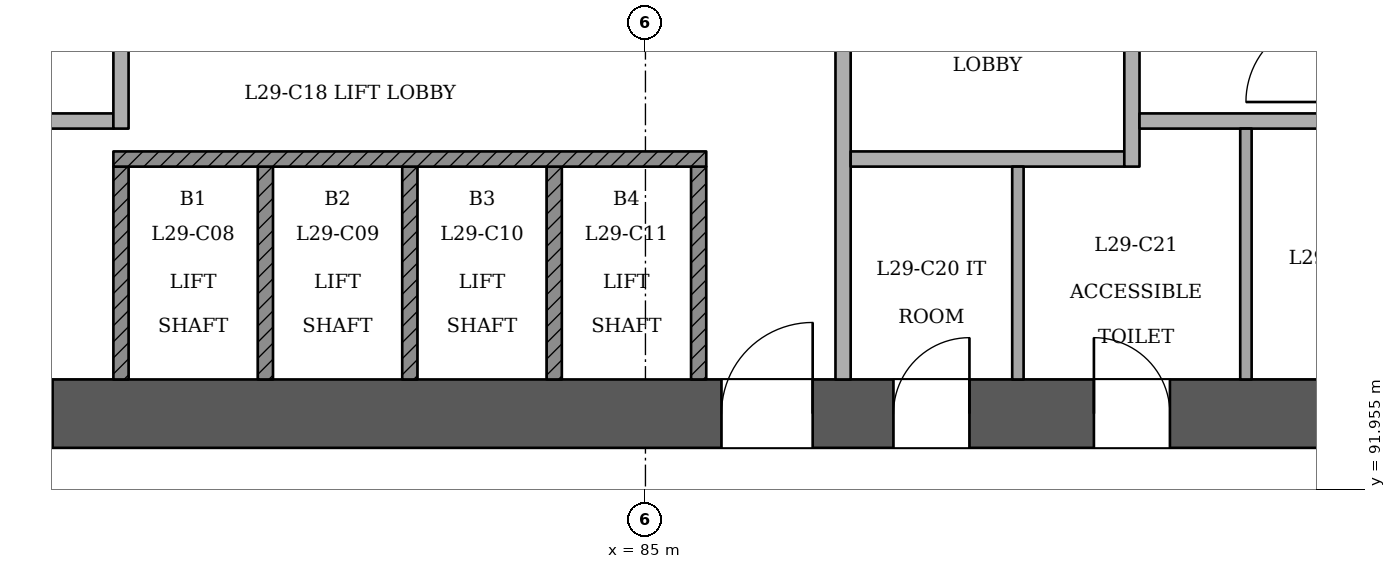
"""IFC4 building model, lengths in metres.
Left out: names, types, materials, properties, quantities, classifications, styles, units other than length and angle.
Written with IfcOpenShell. Run it as: python <this file> out.ifc"""

import sys

from ifc_helpers import new_model, si_unit, direction, frame, frame_2d, origin, place, context, subcontext, project, spatial, rectangle, extrude, element, fill, save


model = new_model("IFC4")
c1 = context("Model", 3, precision=1e-05, world=origin(), true_north=direction((0.0, 1.0)))
c2 = subcontext(c1, "Body", "Model", "MODEL_VIEW")
j1 = project(units=[si_unit("LENGTHUNIT", "METRE"), si_unit("PLANEANGLEUNIT", "RADIAN")], contexts=[c1])
p1 = place(None, origin())
s1 = spatial("IfcSite", under=j1, at=p1, CompositionType="ELEMENT")
p2 = place(p1, origin())
s2 = spatial("IfcBuilding", under=s1, at=p2, CompositionType="ELEMENT")
p3 = place(p2, frame((0.0, 0.0, 115.2)))
s3 = spatial("IfcBuildingStorey", under=s2, at=p3, CompositionType="ELEMENT", Elevation=115.2)
p4 = place(p3, frame((72.55, 92.95, 0.0), z_axis=(0.0, 0.0, 1.0), x_axis=(1.0, 0.0, 0.0)))
e1 = element("IfcWall", 1, at=p4, inside=s3, PredefinedType="SHEAR", context=c2, shape_type="SweptSolid", body=[
    extrude(rectangle(XDim=25.35, YDim=0.9, at=frame_2d((12.675, 0.0))), origin(), (0.0, 0.0, 1.0), 3.6),
])
p5 = place(p4, frame((1.25, 0.0, 0.0)))
e2 = element("IfcOpeningElement", 2, at=p5, cuts=e1, PredefinedType="OPENING", context=c2, shape_type="SweptSolid", body=[
    extrude(rectangle(XDim=1.2, YDim=2.1, at=frame_2d((0.6, 1.05))), frame((0.0, 0.46, 0.0), z_axis=(0.0, -1.0, 0.0), x_axis=(1.0, 0.0, 0.0)), (0.0, 0.0, 1.0), 0.921),
])
p6 = place(p4, frame((3.45, 0.0, 0.0)))
e3 = element("IfcOpeningElement", 3, at=p6, cuts=e1, PredefinedType="OPENING", context=c2, shape_type="SweptSolid", body=[
    extrude(rectangle(XDim=1.2, YDim=2.1, at=frame_2d((0.6, 1.05))), frame((0.0, 0.46, 0.0), z_axis=(0.0, -1.0, 0.0), x_axis=(1.0, 0.0, 0.0)), (0.0, 0.0, 1.0), 0.921),
])
p7 = place(p4, frame((13.45, 0.0, 0.0)))
e4 = element("IfcOpeningElement", 4, at=p7, cuts=e1, PredefinedType="OPENING", context=c2, shape_type="SweptSolid", body=[
    extrude(rectangle(XDim=1.2, YDim=2.1, at=frame_2d((0.6, 1.05))), frame((0.0, 0.46, 0.0), z_axis=(0.0, -1.0, 0.0), x_axis=(1.0, 0.0, 0.0)), (0.0, 0.0, 1.0), 0.921),
])
p8 = place(p4, frame((15.712, 0.0, 0.0)))
e5 = element("IfcOpeningElement", 5, at=p8, cuts=e1, PredefinedType="OPENING", context=c2, shape_type="SweptSolid", body=[
    extrude(rectangle(XDim=1.0, YDim=2.1, at=frame_2d((0.5, 1.05))), frame((0.0, 0.46, 0.0), z_axis=(0.0, -1.0, 0.0), x_axis=(1.0, 0.0, 0.0)), (0.0, 0.0, 1.0), 0.921),
])
p9 = place(p4, frame((18.35, 0.0, 0.0)))
e6 = element("IfcOpeningElement", 6, at=p9, cuts=e1, PredefinedType="OPENING", context=c2, shape_type="SweptSolid", body=[
    extrude(rectangle(XDim=1.0, YDim=2.1, at=frame_2d((0.5, 1.05))), frame((0.0, 0.46, 0.0), z_axis=(0.0, -1.0, 0.0), x_axis=(1.0, 0.0, 0.0)), (0.0, 0.0, 1.0), 0.921),
])
p10 = place(p4, frame((21.938, 0.0, 0.0)))
e7 = element("IfcOpeningElement", 7, at=p10, cuts=e1, PredefinedType="OPENING", context=c2, shape_type="SweptSolid", body=[
    extrude(rectangle(XDim=1.0, YDim=2.1, at=frame_2d((0.5, 1.05))), frame((0.0, 0.46, 0.0), z_axis=(0.0, -1.0, 0.0), x_axis=(1.0, 0.0, 0.0)), (0.0, 0.0, 1.0), 0.921),
])
p11 = place(p3, frame((64.109, 97.973, 0.0), z_axis=(0.0, 0.0, 1.0), x_axis=(0.499997402089, -0.866026903684, 0.0)))
e8 = element("IfcWall", 8, at=p11, inside=s3, PredefinedType="PARTITIONING", context=c2, shape_type="SweptSolid", body=[
    extrude(rectangle(XDim=41.173, YDim=0.15, at=frame_2d((20.586, 0.0))), origin(), (0.0, 0.0, 1.0), 2.75),
])
p12 = place(p11, frame((0.273, 0.0, 0.0)))
e9 = element("IfcOpeningElement", 9, at=p12, cuts=e8, PredefinedType="OPENING", context=c2, shape_type="SweptSolid", body=[
    extrude(rectangle(XDim=1.2, YDim=2.1, at=frame_2d((0.6, 1.05))), frame((0.0, 0.085, 0.0), z_axis=(0.0, -1.0, 0.0), x_axis=(1.0, 0.0, 0.0)), (0.0, 0.0, 1.0), 0.171),
])
p13 = place(p11, frame((10.987, 0.0, 0.0)))
e10 = element("IfcOpeningElement", 10, at=p13, cuts=e8, PredefinedType="OPENING", context=c2, shape_type="SweptSolid", body=[
    extrude(rectangle(XDim=1.2, YDim=2.1, at=frame_2d((0.6, 1.05))), frame((0.0, 0.085, 0.0), z_axis=(0.0, -1.0, 0.0), x_axis=(1.0, 0.0, 0.0)), (0.0, 0.0, 1.0), 0.171),
])
p14 = place(p11, frame((22.237, 0.0, 0.0)))
e11 = element("IfcOpeningElement", 11, at=p14, cuts=e8, PredefinedType="OPENING", context=c2, shape_type="SweptSolid", body=[
    extrude(rectangle(XDim=1.2, YDim=2.1, at=frame_2d((0.6, 1.05))), frame((0.0, 0.085, 0.0), z_axis=(0.0, -1.0, 0.0), x_axis=(1.0, 0.0, 0.0)), (0.0, 0.0, 1.0), 0.171),
])
p15 = place(p11, frame((32.387, 0.0, 0.0)))
e12 = element("IfcOpeningElement", 12, at=p15, cuts=e8, PredefinedType="OPENING", context=c2, shape_type="SweptSolid", body=[
    extrude(rectangle(XDim=1.2, YDim=2.1, at=frame_2d((0.6, 1.05))), frame((0.0, 0.085, 0.0), z_axis=(0.0, -1.0, 0.0), x_axis=(1.0, 0.0, 0.0)), (0.0, 0.0, 1.0), 0.171),
])
p16 = place(p11, frame((39.95, 0.0, 0.0)))
e13 = element("IfcOpeningElement", 13, at=p16, cuts=e8, PredefinedType="OPENING", context=c2, shape_type="SweptSolid", body=[
    extrude(rectangle(XDim=1.0, YDim=2.1, at=frame_2d((0.5, 1.05))), frame((0.0, 0.085, 0.0), z_axis=(0.0, -1.0, 0.0), x_axis=(1.0, 0.0, 0.0)), (0.0, 0.0, 1.0), 0.171),
])
p17 = place(p3, frame((85.304, 62.316, 0.0), z_axis=(0.0, 0.0, 1.0), x_axis=(0.499997402089, 0.866026903684, 0.0)))
e14 = element("IfcWall", 14, at=p17, inside=s3, PredefinedType="PARTITIONING", context=c2, shape_type="SweptSolid", body=[
    extrude(rectangle(XDim=41.173, YDim=0.15, at=frame_2d((20.586, 0.0))), origin(), (0.0, 0.0, 1.0), 2.75),
])
p18 = place(p17, frame((0.248, 0.0, 0.0)))
e15 = element("IfcOpeningElement", 15, at=p18, cuts=e14, PredefinedType="OPENING", context=c2, shape_type="SweptSolid", body=[
    extrude(rectangle(XDim=1.2, YDim=2.1, at=frame_2d((0.6, 1.05))), frame((0.0, 0.085, 0.0), z_axis=(0.0, -1.0, 0.0), x_axis=(1.0, 0.0, 0.0)), (0.0, 0.0, 1.0), 0.171),
])
p19 = place(p17, frame((8.737, 0.0, 0.0)))
e16 = element("IfcOpeningElement", 16, at=p19, cuts=e14, PredefinedType="OPENING", context=c2, shape_type="SweptSolid", body=[
    extrude(rectangle(XDim=1.2, YDim=2.1, at=frame_2d((0.6, 1.05))), frame((0.0, 0.085, 0.0), z_axis=(0.0, -1.0, 0.0), x_axis=(1.0, 0.0, 0.0)), (0.0, 0.0, 1.0), 0.171),
])
p20 = place(p17, frame((22.237, 0.0, 0.0)))
e17 = element("IfcOpeningElement", 17, at=p20, cuts=e14, PredefinedType="OPENING", context=c2, shape_type="SweptSolid", body=[
    extrude(rectangle(XDim=1.2, YDim=2.1, at=frame_2d((0.6, 1.05))), frame((0.0, 0.085, 0.0), z_axis=(0.0, -1.0, 0.0), x_axis=(1.0, 0.0, 0.0)), (0.0, 0.0, 1.0), 0.171),
])
p21 = place(p17, frame((32.387, 0.0, 0.0)))
e18 = element("IfcOpeningElement", 18, at=p21, cuts=e14, PredefinedType="OPENING", context=c2, shape_type="SweptSolid", body=[
    extrude(rectangle(XDim=1.2, YDim=2.1, at=frame_2d((0.6, 1.05))), frame((0.0, 0.085, 0.0), z_axis=(0.0, -1.0, 0.0), x_axis=(1.0, 0.0, 0.0)), (0.0, 0.0, 1.0), 0.171),
])
p22 = place(p17, frame((39.725, 0.0, 0.0)))
e19 = element("IfcOpeningElement", 19, at=p22, cuts=e14, PredefinedType="OPENING", context=c2, shape_type="SweptSolid", body=[
    extrude(rectangle(XDim=1.2, YDim=2.1, at=frame_2d((0.6, 1.05))), frame((0.0, 0.085, 0.0), z_axis=(0.0, -1.0, 0.0), x_axis=(1.0, 0.0, 0.0)), (0.0, 0.0, 1.0), 0.171),
])
for number, where, z_axis, x_axis in (
    (20, (78.1, 93.4, 0.0), (0.0, 0.0, 1.0), (0.0, 1.0, 0.0)),
    (21, (80.0, 93.4, 0.0), (0.0, 0.0, 1.0), (0.0, 1.0, 0.0)),
    (22, (81.9, 93.4, 0.0), (0.0, 0.0, 1.0), (0.0, 1.0, 0.0)),
    (23, (83.8, 93.4, 0.0), (0.0, 0.0, 1.0), (0.0, 1.0, 0.0)),
    (24, (85.7, 93.4, 0.0), (0.0, 0.0, 1.0), (0.0, 1.0, 0.0)),
):
    element("IfcWall", number, at=place(p3, frame(where, z_axis=z_axis, x_axis=x_axis)), inside=s3, PredefinedType="SOLIDWALL", context=c2, shape_type="SweptSolid", body=[
        extrude(rectangle(XDim=2.8, YDim=0.2, at=frame_2d((1.4, 0.0))), origin(), (0.0, 0.0, 1.0), 3.15),
    ])
p23 = place(p3, frame((87.6, 93.4, 0.0), z_axis=(0.0, 0.0, 1.0), x_axis=(0.0, 1.0, 0.0)))
e25 = element("IfcWall", 25, at=p23, inside=s3, PredefinedType="PARTITIONING", context=c2, shape_type="SweptSolid", body=[
    extrude(rectangle(XDim=7.0, YDim=0.2, at=frame_2d((3.5, 0.0))), origin(), (0.0, 0.0, 1.0), 3.15),
])
p24 = place(p23, frame((4.45, 0.0, 0.0)))
e26 = element("IfcOpeningElement", 26, at=p24, cuts=e25, PredefinedType="OPENING", context=c2, shape_type="SweptSolid", body=[
    extrude(rectangle(XDim=1.1, YDim=2.1, at=frame_2d((0.55, 1.05))), frame((0.0, 0.11, 0.0), z_axis=(0.0, -1.0, 0.0), x_axis=(1.0, 0.0, 0.0)), (0.0, 0.0, 1.0), 0.221),
])
p25 = place(p3, frame((89.9, 93.4, 0.0), z_axis=(0.0, 0.0, 1.0), x_axis=(0.0, 1.0, 0.0)))
e27 = element("IfcWall", 27, at=p25, inside=s3, PredefinedType="PARTITIONING", context=c2, shape_type="SweptSolid", body=[
    extrude(rectangle(XDim=2.8, YDim=0.15, at=frame_2d((1.4, 0.0))), origin(), (0.0, 0.0, 1.0), 3.15),
])
p26 = place(p3, frame((92.9, 93.4, 0.0), z_axis=(0.0, 0.0, 1.0), x_axis=(0.0, 1.0, 0.0)))
e28 = element("IfcWall", 28, at=p26, inside=s3, PredefinedType="PARTITIONING", context=c2, shape_type="SweptSolid", body=[
    extrude(rectangle(XDim=3.3, YDim=0.15, at=frame_2d((1.65, 0.0))), origin(), (0.0, 0.0, 1.0), 3.15),
])
p27 = place(p3, frame((78.0, 96.3, 0.0), z_axis=(0.0, 0.0, 1.0), x_axis=(1.0, 0.0, 0.0)))
e29 = element("IfcWall", 29, at=p27, inside=s3, PredefinedType="SOLIDWALL", context=c2, shape_type="SweptSolid", body=[
    extrude(rectangle(XDim=7.8, YDim=0.2, at=frame_2d((3.9, 0.0))), origin(), (0.0, 0.0, 1.0), 3.15),
])
p28 = place(p3, frame((87.7, 96.3, 0.0), z_axis=(0.0, 0.0, 1.0), x_axis=(1.0, 0.0, 0.0)))
e30 = element("IfcWall", 30, at=p28, inside=s3, PredefinedType="PARTITIONING", context=c2, shape_type="SweptSolid", body=[
    extrude(rectangle(XDim=3.6, YDim=0.2, at=frame_2d((1.8, 0.0))), origin(), (0.0, 0.0, 1.0), 3.15),
])
p29 = place(p3, frame((91.4, 96.2, 0.0), z_axis=(0.0, 0.0, 1.0), x_axis=(0.0, 1.0, 0.0)))
e31 = element("IfcWall", 31, at=p29, inside=s3, PredefinedType="PARTITIONING", context=c2, shape_type="SweptSolid", body=[
    extrude(rectangle(XDim=4.2, YDim=0.2, at=frame_2d((2.1, 0.0))), origin(), (0.0, 0.0, 1.0), 3.15),
])
p30 = place(p29, frame((2.45, 0.0, 0.0)))
e32 = element("IfcOpeningElement", 32, at=p30, cuts=e31, PredefinedType="OPENING", context=c2, shape_type="SweptSolid", body=[
    extrude(rectangle(XDim=1.1, YDim=2.1, at=frame_2d((0.55, 1.05))), frame((0.0, 0.11, 0.0), z_axis=(0.0, -1.0, 0.0), x_axis=(1.0, 0.0, 0.0)), (0.0, 0.0, 1.0), 0.221),
])
p31 = place(p3, frame((76.1, 96.8, 0.0), z_axis=(0.0, 0.0, 1.0), x_axis=(1.0, 0.0, 0.0)))
e33 = element("IfcWall", 33, at=p31, inside=s3, PredefinedType="PARTITIONING", context=c2, shape_type="SweptSolid", body=[
    extrude(rectangle(XDim=1.9, YDim=0.2, at=frame_2d((0.95, 0.0))), origin(), (0.0, 0.0, 1.0), 3.15),
])
p32 = place(p3, frame((78.1, 96.7, 0.0), z_axis=(0.0, 0.0, 1.0), x_axis=(0.0, 1.0, 0.0)))
e34 = element("IfcWall", 34, at=p32, inside=s3, PredefinedType="PARTITIONING", context=c2, shape_type="SweptSolid", body=[
    extrude(rectangle(XDim=3.7, YDim=0.2, at=frame_2d((1.85, 0.0))), origin(), (0.0, 0.0, 1.0), 3.15),
])
p33 = place(p32, frame((1.95, 0.0, 0.0)))
e35 = element("IfcOpeningElement", 35, at=p33, cuts=e34, PredefinedType="OPENING", context=c2, shape_type="SweptSolid", body=[
    extrude(rectangle(XDim=1.1, YDim=2.1, at=frame_2d((0.55, 1.05))), frame((0.0, 0.11, 0.0), z_axis=(0.0, -1.0, 0.0), x_axis=(1.0, 0.0, 0.0)), (0.0, 0.0, 1.0), 0.221),
])
p34 = place(p3, frame((91.5, 96.8, 0.0), z_axis=(0.0, 0.0, 1.0), x_axis=(1.0, 0.0, 0.0)))
e36 = element("IfcWall", 36, at=p34, inside=s3, PredefinedType="PARTITIONING", context=c2, shape_type="SweptSolid", body=[
    extrude(rectangle(XDim=2.4, YDim=0.2, at=frame_2d((1.2, 0.0))), origin(), (0.0, 0.0, 1.0), 3.15),
])
p35 = place(p6, origin())
e37 = element("IfcDoor", 37, at=p35, inside=s3, OperationType="SINGLE_SWING_LEFT", PredefinedType="NOTDEFINED", context=c2, shape_type="SweptSolid", body=[
    extrude(rectangle(XDim=1.2, YDim=2.1, at=frame_2d((0.6, 1.05))), frame((0.0, 0.025, 0.0), z_axis=(0.0, -1.0, 0.0), x_axis=(1.0, 0.0, 0.0)), (0.0, 0.0, 1.0), 0.05),
])
fill(e3, e37)
p36 = place(p7, origin())
e38 = element("IfcDoor", 38, at=p36, inside=s3, OperationType="SINGLE_SWING_RIGHT", PredefinedType="NOTDEFINED", context=c2, shape_type="SweptSolid", body=[
    extrude(rectangle(XDim=1.2, YDim=2.1, at=frame_2d((0.6, 1.05))), frame((0.0, 0.025, 0.0), z_axis=(0.0, -1.0, 0.0), x_axis=(1.0, 0.0, 0.0)), (0.0, 0.0, 1.0), 0.05),
])
fill(e4, e38)
p37 = place(p8, origin())
e39 = element("IfcDoor", 39, at=p37, inside=s3, OperationType="SINGLE_SWING_RIGHT", PredefinedType="NOTDEFINED", context=c2, shape_type="SweptSolid", body=[
    extrude(rectangle(XDim=1.0, YDim=2.1, at=frame_2d((0.5, 1.05))), frame((0.0, 0.025, 0.0), z_axis=(0.0, -1.0, 0.0), x_axis=(1.0, 0.0, 0.0)), (0.0, 0.0, 1.0), 0.05),
])
fill(e5, e39)
p38 = place(p9, origin())
e40 = element("IfcDoor", 40, at=p38, inside=s3, OperationType="SINGLE_SWING_LEFT", PredefinedType="NOTDEFINED", context=c2, shape_type="SweptSolid", body=[
    extrude(rectangle(XDim=1.0, YDim=2.1, at=frame_2d((0.5, 1.05))), frame((0.0, 0.025, 0.0), z_axis=(0.0, -1.0, 0.0), x_axis=(1.0, 0.0, 0.0)), (0.0, 0.0, 1.0), 0.05),
])
fill(e6, e40)
save(model, sys.argv[1])
